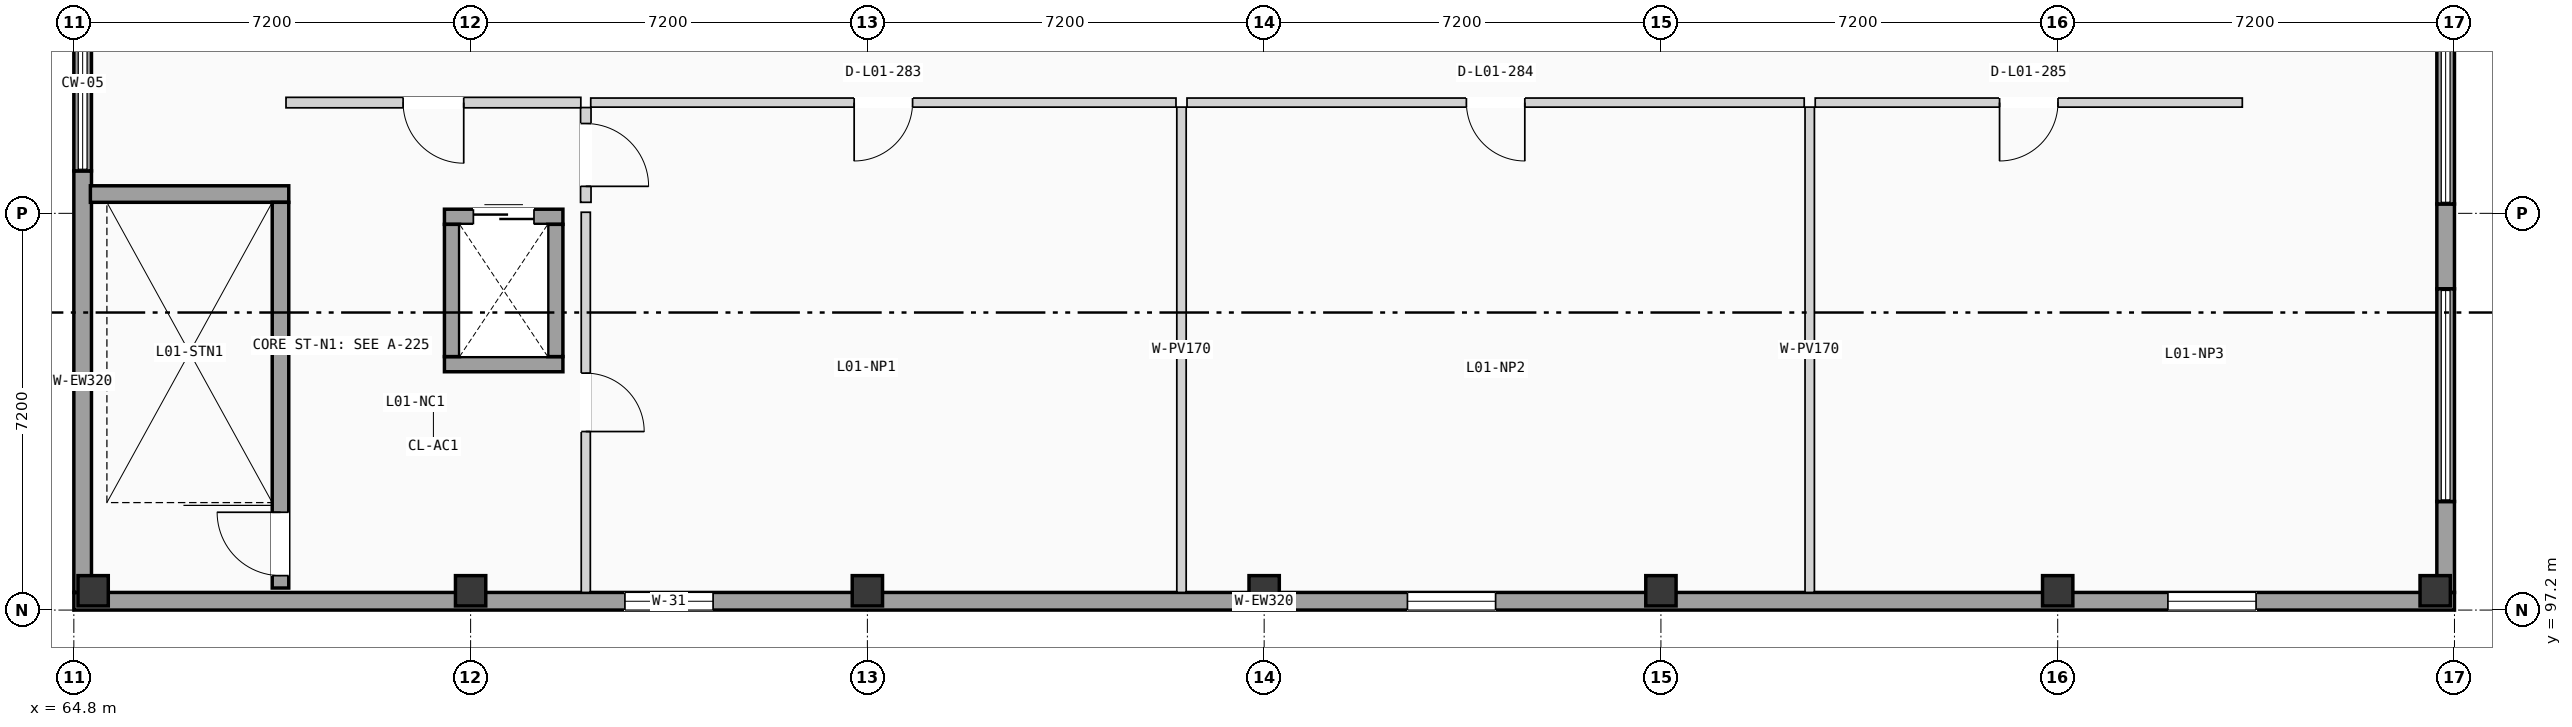
"""IFC4 building model, lengths in metres.
Left out: names, types, materials, properties, quantities, classifications, styles, units other than length and angle.
Written with IfcOpenShell. Run it as: python <this file> out.ifc"""

import sys

from ifc_helpers import new_model, si_unit, direction, frame, frame_2d, origin, origin_2d, place, context, subcontext, project, spatial, rectangle, extrude, element, fill, save


model = new_model("IFC4")
c1 = context("Model", 3, precision=1e-05, world=origin(), true_north=direction((0.0, 1.0)))
c2 = subcontext(c1, "Body", "Model", "MODEL_VIEW")
j1 = project(units=[si_unit("LENGTHUNIT", "METRE"), si_unit("PLANEANGLEUNIT", "RADIAN")], contexts=[c1])
p1 = place(None, origin())
s1 = spatial("IfcSite", under=j1, at=p1, CompositionType="ELEMENT")
p2 = place(p1, origin())
s2 = spatial("IfcBuilding", under=s1, at=p2, CompositionType="ELEMENT")
p3 = place(p2, frame((0.0, 0.0, 4.9)))
s3 = spatial("IfcBuildingStorey", under=s2, at=p3, CompositionType="ELEMENT", Elevation=4.9)
for number, where, z_axis, x_axis in (
    (1, (65.15, 97.55, 0.0), (0.0, 0.0, 1.0), (1.0, 0.0, 0.0)),
    (2, (72.0, 97.55, 0.0), (0.0, 0.0, 1.0), (1.0, 0.0, 0.0)),
    (3, (79.2, 97.55, 0.0), (0.0, 0.0, 1.0), (1.0, 0.0, 0.0)),
    (4, (86.4, 97.55, 0.0), (0.0, 0.0, 1.0), (1.0, 0.0, 0.0)),
    (5, (93.6, 97.55, 0.0), (0.0, 0.0, 1.0), (1.0, 0.0, 0.0)),
    (6, (100.8, 97.55, 0.0), (0.0, 0.0, 1.0), (1.0, 0.0, 0.0)),
    (7, (107.65, 97.55, 0.0), (0.0, 0.0, 1.0), (1.0, 0.0, 0.0)),
):
    element("IfcColumn", number, at=place(p3, frame(where, z_axis=z_axis, x_axis=x_axis)), inside=s3, PredefinedType="COLUMN", context=c2, shape_type="SweptSolid", body=[
        extrude(rectangle(XDim=0.55, YDim=0.55, at=origin_2d()), origin(), (0.0, 0.0, 1.0), 3.675),
    ])
p4 = place(p3, frame((64.8, 97.36, 0.0), z_axis=(0.0, 0.0, 1.0), x_axis=(1.0, 0.0, 0.0)))
e8 = element("IfcWall", 8, at=p4, inside=s3, PredefinedType="SOLIDWALL", context=c2, shape_type="SweptSolid", body=[
    extrude(rectangle(XDim=43.2, YDim=0.32, at=frame_2d((21.6, 0.0))), origin(), (0.0, 0.0, 1.0), 3.675),
])
p5 = place(p4, frame((10.0, 0.0, 0.8)))
e9 = element("IfcOpeningElement", 9, at=p5, cuts=e8, PredefinedType="OPENING", context=c2, shape_type="SweptSolid", body=[
    extrude(rectangle(XDim=1.6, YDim=1.2, at=frame_2d((0.8, 0.6))), frame((0.0, 0.17, 0.0), z_axis=(0.0, -1.0, 0.0), x_axis=(1.0, 0.0, 0.0)), (0.0, 0.0, 1.0), 0.34),
])
p6 = place(p4, frame((24.2, 0.0, 0.8)))
e10 = element("IfcOpeningElement", 10, at=p6, cuts=e8, PredefinedType="OPENING", context=c2, shape_type="SweptSolid", body=[
    extrude(rectangle(XDim=1.6, YDim=1.2, at=frame_2d((0.8, 0.6))), frame((0.0, 0.17, 0.0), z_axis=(0.0, -1.0, 0.0), x_axis=(1.0, 0.0, 0.0)), (0.0, 0.0, 1.0), 0.34),
])
p7 = place(p4, frame((38.0, 0.0, 0.8)))
e11 = element("IfcOpeningElement", 11, at=p7, cuts=e8, PredefinedType="OPENING", context=c2, shape_type="SweptSolid", body=[
    extrude(rectangle(XDim=1.6, YDim=1.2, at=frame_2d((0.8, 0.6))), frame((0.0, 0.17, 0.0), z_axis=(0.0, -1.0, 0.0), x_axis=(1.0, 0.0, 0.0)), (0.0, 0.0, 1.0), 0.34),
])
p8 = place(p3, frame((64.96, 97.52, 0.0), z_axis=(0.0, 0.0, 1.0), x_axis=(0.0, 1.0, 0.0)))
e12 = element("IfcWall", 12, at=p8, inside=s3, PredefinedType="SOLIDWALL", context=c2, shape_type="SweptSolid", body=[
    extrude(rectangle(XDim=7.65, YDim=0.32, at=frame_2d((3.825, 0.0))), origin(), (0.0, 0.0, 1.0), 3.675),
])
p9 = place(p3, frame((64.96, 105.17, 0.0), z_axis=(0.0, 0.0, 1.0), x_axis=(0.0, 1.0, 0.0)))
e13 = element("IfcWall", 13, at=p9, inside=s3, PredefinedType="SOLIDWALL", context=c2, shape_type="SweptSolid", body=[
    extrude(rectangle(XDim=3.16, YDim=0.32, at=frame_2d((1.58, 0.0))), origin(), (0.0, 0.0, 1.0), 1.11),
])
p10 = place(p3, frame((107.84, 97.52, 0.0), z_axis=(0.0, 0.0, 1.0), x_axis=(0.0, 1.0, 0.0)))
e14 = element("IfcWall", 14, at=p10, inside=s3, PredefinedType="SOLIDWALL", context=c2, shape_type="SweptSolid", body=[
    extrude(rectangle(XDim=1.65, YDim=0.32, at=frame_2d((0.825, 0.0))), origin(), (0.0, 0.0, 1.0), 3.675),
])
p11 = place(p3, frame((107.84, 103.03, 0.0), z_axis=(0.0, 0.0, 1.0), x_axis=(0.0, 1.0, 0.0)))
e15 = element("IfcWall", 15, at=p11, inside=s3, PredefinedType="SOLIDWALL", context=c2, shape_type="SweptSolid", body=[
    extrude(rectangle(XDim=1.54, YDim=0.32, at=frame_2d((0.77, 0.0))), origin(), (0.0, 0.0, 1.0), 3.675),
])
p12 = place(p3, frame((107.84, 99.17, 0.0), z_axis=(0.0, 0.0, 1.0), x_axis=(0.0, 1.0, 0.0)))
e16 = element("IfcWall", 16, at=p12, inside=s3, PredefinedType="SOLIDWALL", context=c2, shape_type="SweptSolid", body=[
    extrude(rectangle(XDim=3.86, YDim=0.32, at=frame_2d((1.93, 0.0))), origin(), (0.0, 0.0, 1.0), 1.11),
])
p13 = place(p3, frame((107.84, 104.57, 0.0), z_axis=(0.0, 0.0, 1.0), x_axis=(0.0, 1.0, 0.0)))
e17 = element("IfcWall", 17, at=p13, inside=s3, PredefinedType="SOLIDWALL", context=c2, shape_type="SweptSolid", body=[
    extrude(rectangle(XDim=3.86, YDim=0.32, at=frame_2d((1.93, 0.0))), origin(), (0.0, 0.0, 1.0), 1.11),
])
p14 = place(p3, frame((65.1, 104.75, 0.0), z_axis=(0.0, 0.0, 1.0), x_axis=(1.0, 0.0, 0.0)))
e18 = element("IfcWall", 18, at=p14, inside=s3, PredefinedType="SHEAR", context=c2, shape_type="SweptSolid", body=[
    extrude(rectangle(XDim=3.6, YDim=0.3, at=frame_2d((1.8, 0.0))), origin(), (0.0, 0.0, 1.0), 3.405),
])
p15 = place(p3, frame((68.55, 97.6, 0.0), z_axis=(0.0, 0.0, 1.0), x_axis=(0.0, 1.0, 0.0)))
e19 = element("IfcWall", 19, at=p15, inside=s3, PredefinedType="SHEAR", context=c2, shape_type="SweptSolid", body=[
    extrude(rectangle(XDim=7.0, YDim=0.3, at=frame_2d((3.5, 0.0))), origin(), (0.0, 0.0, 1.0), 3.405),
])
p16 = place(p15, frame((0.225, 0.0, 0.0)))
e20 = element("IfcOpeningElement", 20, at=p16, cuts=e19, PredefinedType="OPENING", context=c2, shape_type="SweptSolid", body=[
    extrude(rectangle(XDim=1.15, YDim=2.12, at=frame_2d((0.575, 1.06))), frame((0.0, 0.16, 0.0), z_axis=(0.0, -1.0, 0.0), x_axis=(1.0, 0.0, 0.0)), (0.0, 0.0, 1.0), 0.32),
])
p17 = place(p3, frame((71.525, 101.663, 0.0), z_axis=(0.0, 0.0, 1.0), x_axis=(1.0, 0.0, 0.0)))
e21 = element("IfcWall", 21, at=p17, inside=s3, PredefinedType="SHEAR", context=c2, shape_type="SweptSolid", body=[
    extrude(rectangle(XDim=2.15, YDim=0.275, at=frame_2d((1.075, 0.0))), origin(), (0.0, 0.0, 1.0), 3.405),
])
p18 = place(p3, frame((71.525, 104.337, 0.0), z_axis=(0.0, 0.0, 1.0), x_axis=(1.0, 0.0, 0.0)))
e22 = element("IfcWall", 22, at=p18, inside=s3, PredefinedType="SHEAR", context=c2, shape_type="SweptSolid", body=[
    extrude(rectangle(XDim=2.15, YDim=0.275, at=frame_2d((1.075, 0.0))), origin(), (0.0, 0.0, 1.0), 3.405),
])
p19 = place(p18, frame((0.525, 0.0, 0.0)))
e23 = element("IfcOpeningElement", 23, at=p19, cuts=e22, PredefinedType="OPENING", context=c2, shape_type="SweptSolid", body=[
    extrude(rectangle(XDim=1.1, YDim=2.15, at=frame_2d((0.55, 1.075))), frame((0.0, 0.147, 0.0), z_axis=(0.0, -1.0, 0.0), x_axis=(1.0, 0.0, 0.0)), (0.0, 0.0, 1.0), 0.295),
])
for number, where, z_axis, x_axis in (
    (24, (71.663, 101.8, 0.0), (0.0, 0.0, 1.0), (0.0, 1.0, 0.0)),
    (25, (73.538, 101.8, 0.0), (0.0, 0.0, 1.0), (0.0, 1.0, 0.0)),
):
    element("IfcWall", number, at=place(p3, frame(where, z_axis=z_axis, x_axis=x_axis)), inside=s3, PredefinedType="SHEAR", context=c2, shape_type="SweptSolid", body=[
        extrude(rectangle(XDim=2.4, YDim=0.275, at=frame_2d((1.2, 0.0))), origin(), (0.0, 0.0, 1.0), 3.405),
    ])
p20 = place(p3, frame((74.09, 97.52, 0.0), z_axis=(0.0, 0.0, 1.0), x_axis=(0.0, 1.0, 0.0)))
e26 = element("IfcWall", 26, at=p20, inside=s3, PredefinedType="PARTITIONING", context=c2, shape_type="SweptSolid", body=[
    extrude(rectangle(XDim=6.9, YDim=0.165, at=frame_2d((3.45, 0.0))), origin(), (0.0, 0.0, 1.0), 2.84),
])
p21 = place(p20, frame((2.92, 0.0, 0.0)))
e27 = element("IfcOpeningElement", 27, at=p21, cuts=e26, PredefinedType="OPENING", context=c2, shape_type="SweptSolid", body=[
    extrude(rectangle(XDim=1.06, YDim=2.14, at=frame_2d((0.53, 1.07))), frame((0.0, 0.093, 0.0), z_axis=(0.0, -1.0, 0.0), x_axis=(1.0, 0.0, 0.0)), (0.0, 0.0, 1.0), 0.185),
])
p22 = place(p3, frame((68.65, 106.41, 0.0), z_axis=(0.0, 0.0, 1.0), x_axis=(1.0, 0.0, 0.0)))
e28 = element("IfcWall", 28, at=p22, inside=s3, PredefinedType="PARTITIONING", context=c2, shape_type="SweptSolid", body=[
    extrude(rectangle(XDim=5.35, YDim=0.19, at=frame_2d((2.675, 0.0))), origin(), (0.0, 0.0, 1.0), 2.84),
])
p23 = place(p22, frame((2.125, 0.0, 0.0)))
e29 = element("IfcOpeningElement", 29, at=p23, cuts=e28, PredefinedType="OPENING", context=c2, shape_type="SweptSolid", body=[
    extrude(rectangle(XDim=1.1, YDim=2.12, at=frame_2d((0.55, 1.06))), frame((0.0, 0.105, 0.0), z_axis=(0.0, -1.0, 0.0), x_axis=(1.0, 0.0, 0.0)), (0.0, 0.0, 1.0), 0.21),
])
p24 = place(p3, frame((74.09, 104.6, 0.0), z_axis=(0.0, 0.0, 1.0), x_axis=(0.0, 1.0, 0.0)))
e30 = element("IfcWall", 30, at=p24, inside=s3, PredefinedType="PARTITIONING", context=c2, shape_type="SweptSolid", body=[
    extrude(rectangle(XDim=1.72, YDim=0.19, at=frame_2d((0.86, 0.0))), origin(), (0.0, 0.0, 1.0), 2.84),
])
p25 = place(p24, frame((0.29, 0.0, 0.0)))
e31 = element("IfcOpeningElement", 31, at=p25, cuts=e30, PredefinedType="OPENING", context=c2, shape_type="SweptSolid", body=[
    extrude(rectangle(XDim=1.14, YDim=2.18, at=frame_2d((0.57, 1.09))), frame((0.0, 0.105, 0.0), z_axis=(0.0, -1.0, 0.0), x_axis=(1.0, 0.0, 0.0)), (0.0, 0.0, 1.0), 0.21),
])
p26 = place(p3, frame((74.18, 106.41, 0.0), z_axis=(0.0, 0.0, 1.0), x_axis=(1.0, 0.0, 0.0)))
e32 = element("IfcWall", 32, at=p26, inside=s3, PredefinedType="PARTITIONING", context=c2, shape_type="SweptSolid", body=[
    extrude(rectangle(XDim=10.62, YDim=0.165, at=frame_2d((5.31, 0.0))), origin(), (0.0, 0.0, 1.0), 2.84),
])
p27 = place(p26, frame((4.78, 0.0, 0.0)))
e33 = element("IfcOpeningElement", 33, at=p27, cuts=e32, PredefinedType="OPENING", context=c2, shape_type="SweptSolid", body=[
    extrude(rectangle(XDim=1.06, YDim=2.14, at=frame_2d((0.53, 1.07))), frame((0.0, 0.093, 0.0), z_axis=(0.0, -1.0, 0.0), x_axis=(1.0, 0.0, 0.0)), (0.0, 0.0, 1.0), 0.185),
])
p28 = place(p3, frame((85.0, 106.41, 0.0), z_axis=(0.0, 0.0, 1.0), x_axis=(1.0, 0.0, 0.0)))
e34 = element("IfcWall", 34, at=p28, inside=s3, PredefinedType="PARTITIONING", context=c2, shape_type="SweptSolid", body=[
    extrude(rectangle(XDim=11.2, YDim=0.165, at=frame_2d((5.6, 0.0))), origin(), (0.0, 0.0, 1.0), 2.84),
])
p29 = place(p28, frame((5.07, 0.0, 0.0)))
e35 = element("IfcOpeningElement", 35, at=p29, cuts=e34, PredefinedType="OPENING", context=c2, shape_type="SweptSolid", body=[
    extrude(rectangle(XDim=1.06, YDim=2.14, at=frame_2d((0.53, 1.07))), frame((0.0, 0.093, 0.0), z_axis=(0.0, -1.0, 0.0), x_axis=(1.0, 0.0, 0.0)), (0.0, 0.0, 1.0), 0.185),
])
p30 = place(p3, frame((96.4, 106.41, 0.0), z_axis=(0.0, 0.0, 1.0), x_axis=(1.0, 0.0, 0.0)))
e36 = element("IfcWall", 36, at=p30, inside=s3, PredefinedType="PARTITIONING", context=c2, shape_type="SweptSolid", body=[
    extrude(rectangle(XDim=7.75, YDim=0.165, at=frame_2d((3.875, 0.0))), origin(), (0.0, 0.0, 1.0), 2.84),
])
p31 = place(p30, frame((3.345, 0.0, 0.0)))
e37 = element("IfcOpeningElement", 37, at=p31, cuts=e36, PredefinedType="OPENING", context=c2, shape_type="SweptSolid", body=[
    extrude(rectangle(XDim=1.06, YDim=2.14, at=frame_2d((0.53, 1.07))), frame((0.0, 0.093, 0.0), z_axis=(0.0, -1.0, 0.0), x_axis=(1.0, 0.0, 0.0)), (0.0, 0.0, 1.0), 0.185),
])
for number, where, z_axis, x_axis in (
    (38, (84.9, 97.52, 0.0), (0.0, 0.0, 1.0), (0.0, 1.0, 0.0)),
    (39, (96.3, 97.52, 0.0), (0.0, 0.0, 1.0), (0.0, 1.0, 0.0)),
):
    element("IfcWall", number, at=place(p3, frame(where, z_axis=z_axis, x_axis=x_axis)), inside=s3, PredefinedType="PARTITIONING", context=c2, shape_type="SweptSolid", body=[
        extrude(rectangle(XDim=8.808, YDim=0.17, at=frame_2d((4.404, 0.0))), origin(), (0.0, 0.0, 1.0), 2.84),
    ])
p32 = place(p5, origin())
e40 = element("IfcWindow", 40, at=p32, inside=s3, PartitioningType="DOUBLE_PANEL_VERTICAL", PredefinedType="WINDOW", context=c2, shape_type="SweptSolid", body=[
    extrude(rectangle(XDim=1.6, YDim=1.2, at=frame_2d((0.8, 0.6))), frame((0.0, 0.03, 0.0), z_axis=(0.0, -1.0, 0.0), x_axis=(1.0, 0.0, 0.0)), (0.0, 0.0, 1.0), 0.06),
])
fill(e9, e40)
p33 = place(p6, origin())
e41 = element("IfcWindow", 41, at=p33, inside=s3, PartitioningType="DOUBLE_PANEL_VERTICAL", PredefinedType="WINDOW", context=c2, shape_type="SweptSolid", body=[
    extrude(rectangle(XDim=1.6, YDim=1.2, at=frame_2d((0.8, 0.6))), frame((0.0, 0.03, 0.0), z_axis=(0.0, -1.0, 0.0), x_axis=(1.0, 0.0, 0.0)), (0.0, 0.0, 1.0), 0.06),
])
fill(e10, e41)
p34 = place(p7, origin())
e42 = element("IfcWindow", 42, at=p34, inside=s3, PartitioningType="DOUBLE_PANEL_VERTICAL", PredefinedType="WINDOW", context=c2, shape_type="SweptSolid", body=[
    extrude(rectangle(XDim=1.6, YDim=1.2, at=frame_2d((0.8, 0.6))), frame((0.0, 0.03, 0.0), z_axis=(0.0, -1.0, 0.0), x_axis=(1.0, 0.0, 0.0)), (0.0, 0.0, 1.0), 0.06),
])
fill(e11, e42)
p35 = place(p16, origin())
e43 = element("IfcDoor", 43, at=p35, inside=s3, OperationType="SINGLE_SWING_RIGHT", PredefinedType="DOOR", context=c2, shape_type="SweptSolid", body=[
    extrude(rectangle(XDim=1.15, YDim=2.12, at=frame_2d((0.575, 1.06))), frame((0.0, 0.025, 0.0), z_axis=(0.0, -1.0, 0.0), x_axis=(1.0, 0.0, 0.0)), (0.0, 0.0, 1.0), 0.05),
])
fill(e20, e43)
p36 = place(p19, origin())
e44 = element("IfcDoor", 44, at=p36, inside=s3, OperationType="SLIDING_TO_LEFT", PredefinedType="DOOR", context=c2, shape_type="SweptSolid", body=[
    extrude(rectangle(XDim=1.1, YDim=2.15, at=frame_2d((0.55, 1.075))), frame((0.0, 0.025, 0.0), z_axis=(0.0, -1.0, 0.0), x_axis=(1.0, 0.0, 0.0)), (0.0, 0.0, 1.0), 0.05),
])
fill(e23, e44)
p37 = place(p21, frame((1.06, 0.0, 0.0), z_axis=(0.0, 0.0, 1.0), x_axis=(-1.0, 0.0, 0.0)))
e45 = element("IfcDoor", 45, at=p37, inside=s3, OperationType="SINGLE_SWING_LEFT", PredefinedType="DOOR", context=c2, shape_type="SweptSolid", body=[
    extrude(rectangle(XDim=1.06, YDim=2.14, at=frame_2d((0.53, 1.07))), frame((0.0, 0.025, 0.0), z_axis=(0.0, -1.0, 0.0), x_axis=(1.0, 0.0, 0.0)), (0.0, 0.0, 1.0), 0.05),
])
fill(e27, e45)
p38 = place(p23, frame((1.1, 0.0, 0.0), z_axis=(0.0, 0.0, 1.0), x_axis=(-1.0, 0.0, 0.0)))
e46 = element("IfcDoor", 46, at=p38, inside=s3, OperationType="SINGLE_SWING_RIGHT", PredefinedType="DOOR", context=c2, shape_type="SweptSolid", body=[
    extrude(rectangle(XDim=1.1, YDim=2.12, at=frame_2d((0.55, 1.06))), frame((0.0, 0.025, 0.0), z_axis=(0.0, -1.0, 0.0), x_axis=(1.0, 0.0, 0.0)), (0.0, 0.0, 1.0), 0.05),
])
fill(e29, e46)
p39 = place(p25, frame((1.14, 0.0, 0.0), z_axis=(0.0, 0.0, 1.0), x_axis=(-1.0, 0.0, 0.0)))
e47 = element("IfcDoor", 47, at=p39, inside=s3, OperationType="SINGLE_SWING_LEFT", PredefinedType="DOOR", context=c2, shape_type="SweptSolid", body=[
    extrude(rectangle(XDim=1.14, YDim=2.18, at=frame_2d((0.57, 1.09))), frame((0.0, 0.025, 0.0), z_axis=(0.0, -1.0, 0.0), x_axis=(1.0, 0.0, 0.0)), (0.0, 0.0, 1.0), 0.05),
])
fill(e31, e47)
p40 = place(p27, frame((1.06, 0.0, 0.0), z_axis=(0.0, 0.0, 1.0), x_axis=(-1.0, 0.0, 0.0)))
e48 = element("IfcDoor", 48, at=p40, inside=s3, OperationType="SINGLE_SWING_LEFT", PredefinedType="DOOR", context=c2, shape_type="SweptSolid", body=[
    extrude(rectangle(XDim=1.06, YDim=2.14, at=frame_2d((0.53, 1.07))), frame((0.0, 0.025, 0.0), z_axis=(0.0, -1.0, 0.0), x_axis=(1.0, 0.0, 0.0)), (0.0, 0.0, 1.0), 0.05),
])
fill(e33, e48)
p41 = place(p29, frame((1.06, 0.0, 0.0), z_axis=(0.0, 0.0, 1.0), x_axis=(-1.0, 0.0, 0.0)))
e49 = element("IfcDoor", 49, at=p41, inside=s3, OperationType="SINGLE_SWING_RIGHT", PredefinedType="DOOR", context=c2, shape_type="SweptSolid", body=[
    extrude(rectangle(XDim=1.06, YDim=2.14, at=frame_2d((0.53, 1.07))), frame((0.0, 0.025, 0.0), z_axis=(0.0, -1.0, 0.0), x_axis=(1.0, 0.0, 0.0)), (0.0, 0.0, 1.0), 0.05),
])
fill(e35, e49)
p42 = place(p31, frame((1.06, 0.0, 0.0), z_axis=(0.0, 0.0, 1.0), x_axis=(-1.0, 0.0, 0.0)))
e50 = element("IfcDoor", 50, at=p42, inside=s3, OperationType="SINGLE_SWING_LEFT", PredefinedType="DOOR", context=c2, shape_type="SweptSolid", body=[
    extrude(rectangle(XDim=1.06, YDim=2.14, at=frame_2d((0.53, 1.07))), frame((0.0, 0.025, 0.0), z_axis=(0.0, -1.0, 0.0), x_axis=(1.0, 0.0, 0.0)), (0.0, 0.0, 1.0), 0.05),
])
fill(e37, e50)
save(model, sys.argv[1])
